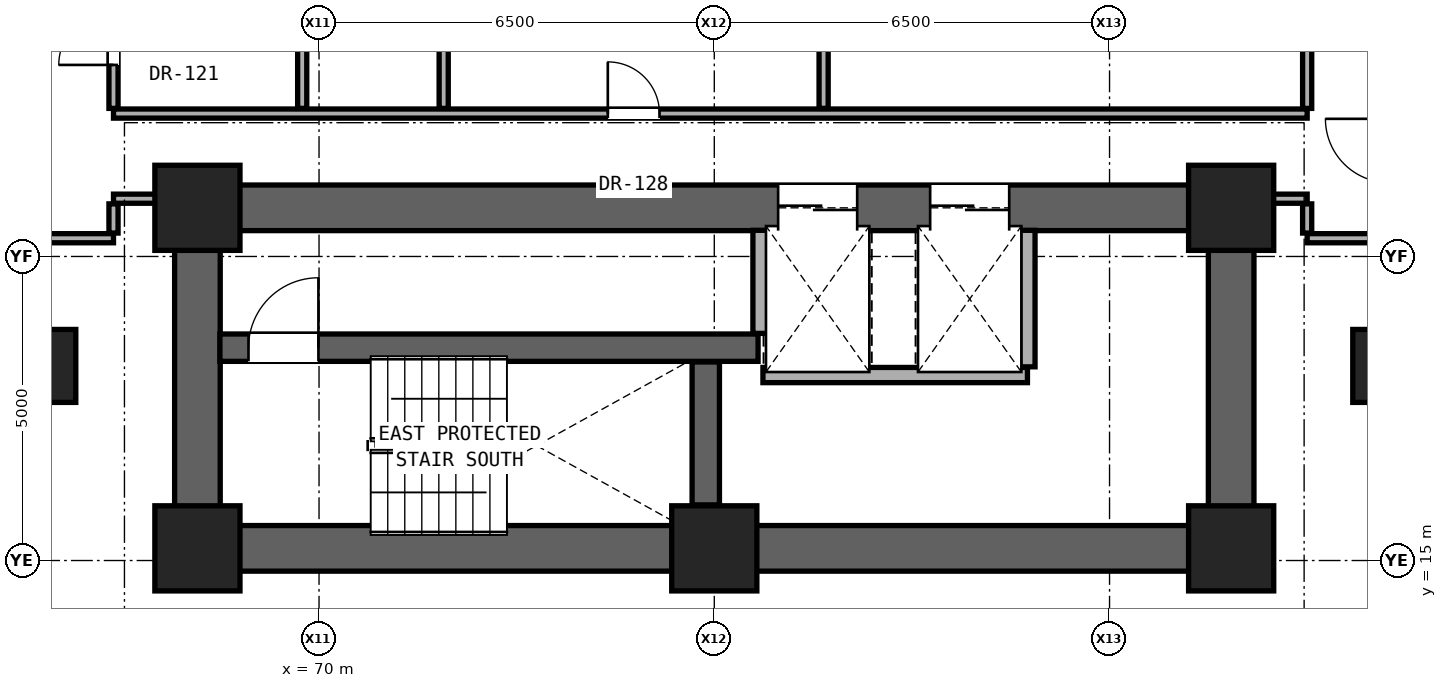
"""IFC4 building model, lengths in metres.
Left out: names, types, materials, properties, quantities, classifications, styles, units other than length and angle.
Written with IfcOpenShell. Run it as: python <this file> out.ifc"""

import sys

from ifc_helpers import new_model, si_unit, direction, frame, frame_2d, origin, origin_2d, place, context, subcontext, project, spatial, rectangle, extrude, element, fill, save


model = new_model("IFC4")
c1 = context("Model", 3, precision=1e-05, world=origin(), true_north=direction((0.0, 1.0)))
c2 = subcontext(c1, "Body", "Model", "MODEL_VIEW")
j1 = project(units=[si_unit("LENGTHUNIT", "METRE"), si_unit("PLANEANGLEUNIT", "RADIAN")], contexts=[c1])
p1 = place(None, origin())
s1 = spatial("IfcSite", under=j1, at=p1, CompositionType="ELEMENT")
p2 = place(p1, origin())
s2 = spatial("IfcBuilding", under=s1, at=p2, CompositionType="ELEMENT")
p3 = place(p2, frame((0.0, 0.0, 48.8)))
s3 = spatial("IfcBuildingStorey", under=s2, at=p3, CompositionType="ELEMENT", Elevation=48.8)
for number, where, z_axis, x_axis in (
    (1, (68.0, 15.2, 0.0), (0.0, 0.0, 1.0), (1.0, 0.0, 0.0)),
    (2, (76.5, 15.2, 0.0), (0.0, 0.0, 1.0), (1.0, 0.0, 0.0)),
    (3, (85.0, 15.2, 0.0), (0.0, 0.0, 1.0), (1.0, 0.0, 0.0)),
    (4, (68.0, 20.8, 0.0), (0.0, 0.0, 1.0), (1.0, 0.0, 0.0)),
    (5, (85.0, 20.8, 0.0), (0.0, 0.0, 1.0), (1.0, 0.0, 0.0)),
):
    element("IfcColumn", number, at=place(p3, frame(where, z_axis=z_axis, x_axis=x_axis)), inside=s3, PredefinedType="COLUMN", context=c2, shape_type="SweptSolid", body=[
        extrude(rectangle(XDim=1.4, YDim=1.4, at=origin_2d()), origin(), (0.0, 0.0, 1.0), 3.3),
    ])
for number, where, z_axis, x_axis in (
    (6, (65.6, 18.2, 0.0), (0.0, 0.0, 1.0), (1.0, 0.0, 0.0)),
    (7, (87.4, 18.2, 0.0), (0.0, 0.0, 1.0), (1.0, 0.0, 0.0)),
):
    element("IfcColumn", number, at=place(p3, frame(where, z_axis=z_axis, x_axis=x_axis)), inside=s3, PredefinedType="PILASTER", context=c2, shape_type="SweptSolid", body=[
        extrude(rectangle(XDim=0.8, YDim=1.2, at=origin_2d()), origin(), (0.0, 0.0, 1.0), 3.3),
    ])
p4 = place(p3, frame((68.0, 15.2, 0.0), z_axis=(0.0, 0.0, 1.0), x_axis=(1.0, 0.0, 0.0)))
e8 = element("IfcWall", 8, at=p4, inside=s3, PredefinedType="SHEAR", context=c2, shape_type="SweptSolid", body=[
    extrude(rectangle(XDim=17.0, YDim=0.75, at=frame_2d((8.5, 0.0))), origin(), (0.0, 0.0, 1.0), 3.06),
])
for number, where, z_axis, x_axis in (
    (9, (68.0, 15.2, 0.0), (0.0, 0.0, 1.0), (0.0, 1.0, 0.0)),
    (10, (85.0, 15.2, 0.0), (0.0, 0.0, 1.0), (0.0, 1.0, 0.0)),
):
    element("IfcWall", number, at=place(p3, frame(where, z_axis=z_axis, x_axis=x_axis)), inside=s3, PredefinedType="SHEAR", context=c2, shape_type="SweptSolid", body=[
        extrude(rectangle(XDim=5.6, YDim=0.75, at=frame_2d((2.8, 0.0))), origin(), (0.0, 0.0, 1.0), 3.06),
    ])
p5 = place(p3, frame((68.0, 20.8, 0.0), z_axis=(0.0, 0.0, 1.0), x_axis=(1.0, 0.0, 0.0)))
e11 = element("IfcWall", 11, at=p5, inside=s3, PredefinedType="SHEAR", context=c2, shape_type="SweptSolid", body=[
    extrude(rectangle(XDim=17.0, YDim=0.75, at=frame_2d((8.5, 0.0))), origin(), (0.0, 0.0, 1.0), 3.06),
])
p6 = place(p5, frame((9.55, 0.0, 0.0)))
e12 = element("IfcOpeningElement", 12, at=p6, cuts=e11, PredefinedType="OPENING", context=c2, shape_type="SweptSolid", body=[
    extrude(rectangle(XDim=1.3, YDim=2.3, at=frame_2d((0.65, 1.15))), frame((0.0, 0.385, 0.0), z_axis=(0.0, -1.0, 0.0), x_axis=(1.0, 0.0, 0.0)), (0.0, 0.0, 1.0), 0.77),
])
p7 = place(p5, frame((12.05, 0.0, 0.0)))
e13 = element("IfcOpeningElement", 13, at=p7, cuts=e11, PredefinedType="OPENING", context=c2, shape_type="SweptSolid", body=[
    extrude(rectangle(XDim=1.3, YDim=2.3, at=frame_2d((0.65, 1.15))), frame((0.0, 0.385, 0.0), z_axis=(0.0, -1.0, 0.0), x_axis=(1.0, 0.0, 0.0)), (0.0, 0.0, 1.0), 0.77),
])
p8 = place(p3, frame((77.3, 18.05, 0.0), z_axis=(0.0, 0.0, 1.0), x_axis=(1.0, 0.0, 0.0)))
e14 = element("IfcWall", 14, at=p8, inside=s3, PredefinedType="SOLIDWALL", context=c2, shape_type="SweptSolid", body=[
    extrude(rectangle(XDim=4.35, YDim=0.25, at=frame_2d((2.175, 0.0))), origin(), (0.0, 0.0, 1.0), 3.06),
])
p9 = place(p3, frame((68.37, 18.5, 0.0), z_axis=(0.0, 0.0, 1.0), x_axis=(1.0, 0.0, 0.0)))
e15 = element("IfcWall", 15, at=p9, inside=s3, PredefinedType="SHEAR", context=c2, shape_type="SweptSolid", body=[
    extrude(rectangle(XDim=8.85, YDim=0.45, at=frame_2d((4.425, 0.0))), origin(), (0.0, 0.0, 1.0), 3.06),
])
p10 = place(p9, frame((0.47, 0.0, 0.0)))
e16 = element("IfcOpeningElement", 16, at=p10, cuts=e15, PredefinedType="OPENING", context=c2, shape_type="SweptSolid", body=[
    extrude(rectangle(XDim=1.15, YDim=2.2, at=frame_2d((0.575, 1.1))), frame((0.0, 0.235, 0.0), z_axis=(0.0, -1.0, 0.0), x_axis=(1.0, 0.0, 0.0)), (0.0, 0.0, 1.0), 0.47),
])
p11 = place(p3, frame((65.25, 20.3, 0.0), z_axis=(0.0, 0.0, 1.0), x_axis=(1.0, 0.0, 0.0)))
e17 = element("IfcWall", 17, at=p11, inside=s3, PredefinedType="PARTITIONING", context=c2, shape_type="SweptSolid", body=[
    extrude(rectangle(XDim=1.37, YDim=0.15, at=frame_2d((0.685, 0.0))), origin(), (0.0, 0.0, 1.0), 3.06),
])
p12 = place(p3, frame((86.25, 20.3, 0.0), z_axis=(0.0, 0.0, 1.0), x_axis=(1.0, 0.0, 0.0)))
e18 = element("IfcWall", 18, at=p12, inside=s3, PredefinedType="PARTITIONING", context=c2, shape_type="SweptSolid", body=[
    extrude(rectangle(XDim=1.35, YDim=0.15, at=frame_2d((0.675, 0.0))), origin(), (0.0, 0.0, 1.0), 3.06),
])
p13 = place(p3, frame((66.62, 20.95, 0.0), z_axis=(0.0, 0.0, 1.0), x_axis=(1.0, 0.0, 0.0)))
e19 = element("IfcWall", 19, at=p13, inside=s3, PredefinedType="PARTITIONING", context=c2, shape_type="SweptSolid", body=[
    extrude(rectangle(XDim=1.01, YDim=0.15, at=frame_2d((0.505, 0.0))), origin(), (0.0, 0.0, 1.0), 2.452),
])
p14 = place(p3, frame((85.37, 20.95, 0.0), z_axis=(0.0, 0.0, 1.0), x_axis=(1.0, 0.0, 0.0)))
e20 = element("IfcWall", 20, at=p14, inside=s3, PredefinedType="PARTITIONING", context=c2, shape_type="SweptSolid", body=[
    extrude(rectangle(XDim=0.88, YDim=0.15, at=frame_2d((0.44, 0.0))), origin(), (0.0, 0.0, 1.0), 2.452),
])
p15 = place(p3, frame((66.62, 22.35, 0.0), z_axis=(0.0, 0.0, 1.0), x_axis=(1.0, 0.0, 0.0)))
e21 = element("IfcWall", 21, at=p15, inside=s3, PredefinedType="PARTITIONING", context=c2, shape_type="SweptSolid", body=[
    extrude(rectangle(XDim=19.63, YDim=0.15, at=frame_2d((9.815, 0.0))), origin(), (0.0, 0.0, 1.0), 2.125),
])
p16 = place(p15, frame((8.129, 0.0, 0.0)))
e22 = element("IfcOpeningElement", 22, at=p16, cuts=e21, PredefinedType="OPENING", context=c2, shape_type="SweptSolid", body=[
    extrude(rectangle(XDim=0.85, YDim=2.01, at=frame_2d((0.425, 1.005))), frame((0.0, 0.085, 0.0), z_axis=(0.0, -1.0, 0.0), x_axis=(1.0, 0.0, 0.0)), (0.0, 0.0, 1.0), 0.17),
])
p17 = place(p3, frame((66.62, 20.385, 0.0), z_axis=(0.0, 0.0, 1.0), x_axis=(0.0, 1.0, 0.0)))
e23 = element("IfcWall", 23, at=p17, inside=s3, PredefinedType="PARTITIONING", context=c2, shape_type="SweptSolid", body=[
    extrude(rectangle(XDim=0.48, YDim=0.15, at=frame_2d((0.24, 0.0))), origin(), (0.0, 0.0, 1.0), 2.452),
])
p18 = place(p3, frame((66.62, 22.435, 0.0), z_axis=(0.0, 0.0, 1.0), x_axis=(0.0, 1.0, 0.0)))
e24 = element("IfcWall", 24, at=p18, inside=s3, PredefinedType="PARTITIONING", context=c2, shape_type="SweptSolid", body=[
    extrude(rectangle(XDim=2.33, YDim=0.15, at=frame_2d((1.165, 0.0))), origin(), (0.0, 0.0, 1.0), 3.06),
])
p19 = place(p18, frame((0.715, 0.0, 0.0)))
e25 = element("IfcOpeningElement", 25, at=p19, cuts=e24, PredefinedType="OPENING", context=c2, shape_type="SweptSolid", body=[
    extrude(rectangle(XDim=0.9, YDim=2.1, at=frame_2d((0.45, 1.05))), frame((0.0, 0.085, 0.0), z_axis=(0.0, -1.0, 0.0), x_axis=(1.0, 0.0, 0.0)), (0.0, 0.0, 1.0), 0.17),
])
p20 = place(p3, frame((69.723, 22.435, 0.0), z_axis=(0.0, 0.0, 1.0), x_axis=(0.0, 1.0, 0.0)))
e26 = element("IfcWall", 26, at=p20, inside=s3, PredefinedType="PARTITIONING", context=c2, shape_type="SweptSolid", body=[
    extrude(rectangle(XDim=2.33, YDim=0.15, at=frame_2d((1.165, 0.0))), origin(), (0.0, 0.0, 1.0), 3.06),
])
p21 = place(p3, frame((72.05, 22.435, 0.0), z_axis=(0.0, 0.0, 1.0), x_axis=(0.0, 1.0, 0.0)))
e27 = element("IfcWall", 27, at=p21, inside=s3, PredefinedType="PARTITIONING", context=c2, shape_type="SweptSolid", body=[
    extrude(rectangle(XDim=8.13, YDim=0.15, at=frame_2d((4.065, 0.0))), origin(), (0.0, 0.0, 1.0), 2.125),
])
p22 = place(p3, frame((76.36, 15.915, 0.0), z_axis=(0.0, 0.0, 1.0), x_axis=(0.0, 1.0, 0.0)))
e28 = element("IfcWall", 28, at=p22, inside=s3, PredefinedType="SHEAR", context=c2, shape_type="SweptSolid", body=[
    extrude(rectangle(XDim=2.35, YDim=0.45, at=frame_2d((1.175, 0.0))), origin(), (0.0, 0.0, 1.0), 3.06),
])
p23 = place(p3, frame((77.26, 18.735, 0.0), z_axis=(0.0, 0.0, 1.0), x_axis=(0.0, 1.0, 0.0)))
e29 = element("IfcWall", 29, at=p23, inside=s3, PredefinedType="SOLIDWALL", context=c2, shape_type="SweptSolid", body=[
    extrude(rectangle(XDim=1.695, YDim=0.25, at=frame_2d((0.847, 0.0))), origin(), (0.0, 0.0, 1.0), 3.06),
])
p24 = place(p3, frame((78.298, 22.435, 0.0), z_axis=(0.0, 0.0, 1.0), x_axis=(0.0, 1.0, 0.0)))
e30 = element("IfcWall", 30, at=p24, inside=s3, PredefinedType="PARTITIONING", context=c2, shape_type="SweptSolid", body=[
    extrude(rectangle(XDim=8.13, YDim=0.15, at=frame_2d((4.065, 0.0))), origin(), (0.0, 0.0, 1.0), 2.125),
])
p25 = place(p3, frame((81.65, 18.185, 0.0), z_axis=(0.0, 0.0, 1.0), x_axis=(0.0, 1.0, 0.0)))
e31 = element("IfcWall", 31, at=p25, inside=s3, PredefinedType="SOLIDWALL", context=c2, shape_type="SweptSolid", body=[
    extrude(rectangle(XDim=2.245, YDim=0.25, at=frame_2d((1.123, 0.0))), origin(), (0.0, 0.0, 1.0), 3.06),
])
p26 = place(p3, frame((86.25, 20.385, 0.0), z_axis=(0.0, 0.0, 1.0), x_axis=(0.0, 1.0, 0.0)))
e32 = element("IfcWall", 32, at=p26, inside=s3, PredefinedType="PARTITIONING", context=c2, shape_type="SweptSolid", body=[
    extrude(rectangle(XDim=0.48, YDim=0.15, at=frame_2d((0.24, 0.0))), origin(), (0.0, 0.0, 1.0), 2.452),
])
p27 = place(p3, frame((86.25, 22.435, 0.0), z_axis=(0.0, 0.0, 1.0), x_axis=(0.0, 1.0, 0.0)))
e33 = element("IfcWall", 33, at=p27, inside=s3, PredefinedType="PARTITIONING", context=c2, shape_type="SweptSolid", body=[
    extrude(rectangle(XDim=8.13, YDim=0.15, at=frame_2d((4.065, 0.0))), origin(), (0.0, 0.0, 1.0), 2.279),
])
p28 = place(p10, origin())
e34 = element("IfcDoor", 34, at=p28, inside=s3, OperationType="SINGLE_SWING_RIGHT", PredefinedType="DOOR", context=c2, shape_type="SweptSolid", body=[
    extrude(rectangle(XDim=1.15, YDim=2.2, at=frame_2d((0.575, 1.1))), frame((0.0, 0.025, 0.0), z_axis=(0.0, -1.0, 0.0), x_axis=(1.0, 0.0, 0.0)), (0.0, 0.0, 1.0), 0.05),
])
fill(e16, e34)
p29 = place(p19, origin())
e35 = element("IfcDoor", 35, at=p29, inside=s3, OperationType="SINGLE_SWING_LEFT", PredefinedType="DOOR", context=c2, shape_type="SweptSolid", body=[
    extrude(rectangle(XDim=0.9, YDim=2.1, at=frame_2d((0.45, 1.05))), frame((0.0, 0.025, 0.0), z_axis=(0.0, -1.0, 0.0), x_axis=(1.0, 0.0, 0.0)), (0.0, 0.0, 1.0), 0.05),
])
fill(e25, e35)
p30 = place(p16, origin())
e36 = element("IfcDoor", 36, at=p30, inside=s3, OperationType="SINGLE_SWING_LEFT", PredefinedType="DOOR", context=c2, shape_type="SweptSolid", body=[
    extrude(rectangle(XDim=0.85, YDim=2.01, at=frame_2d((0.425, 1.005))), frame((0.0, 0.025, 0.0), z_axis=(0.0, -1.0, 0.0), x_axis=(1.0, 0.0, 0.0)), (0.0, 0.0, 1.0), 0.05),
])
fill(e22, e36)
p31 = place(p6, origin())
e37 = element("IfcDoor", 37, at=p31, inside=s3, OperationType="DOUBLE_DOOR_SLIDING", PredefinedType="DOOR", context=c2, shape_type="SweptSolid", body=[
    extrude(rectangle(XDim=1.3, YDim=2.3, at=frame_2d((0.65, 1.15))), frame((0.0, 0.025, 0.0), z_axis=(0.0, -1.0, 0.0), x_axis=(1.0, 0.0, 0.0)), (0.0, 0.0, 1.0), 0.05),
])
fill(e12, e37)
p32 = place(p7, origin())
e38 = element("IfcDoor", 38, at=p32, inside=s3, OperationType="DOUBLE_DOOR_SLIDING", PredefinedType="DOOR", context=c2, shape_type="SweptSolid", body=[
    extrude(rectangle(XDim=1.3, YDim=2.3, at=frame_2d((0.65, 1.15))), frame((0.0, 0.025, 0.0), z_axis=(0.0, -1.0, 0.0), x_axis=(1.0, 0.0, 0.0)), (0.0, 0.0, 1.0), 0.05),
])
fill(e13, e38)
save(model, sys.argv[1])
